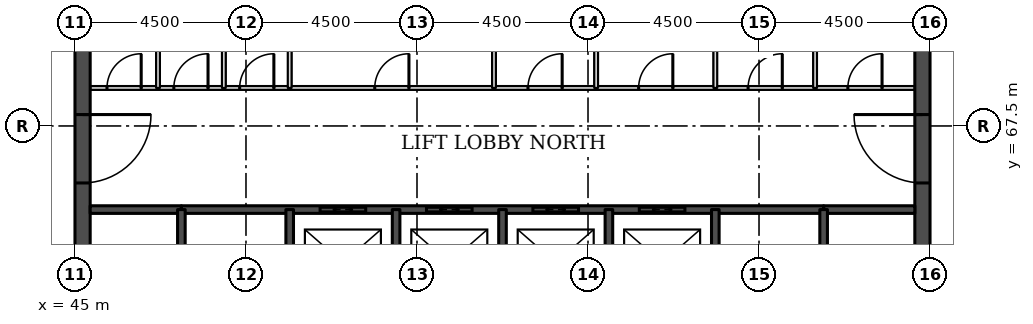
"""IFC4 building model, lengths in metres.
Left out: names, types, materials, properties, quantities, classifications, styles, units other than length and angle.
Written with IfcOpenShell. Run it as: python <this file> out.ifc"""

import sys

from ifc_helpers import new_model, si_unit, direction, frame, frame_2d, origin, place, context, subcontext, project, spatial, rectangle, extrude, element, fill, save


model = new_model("IFC4")
c1 = context("Model", 3, precision=1e-05, world=origin(), true_north=direction((0.0, 1.0)))
c2 = subcontext(c1, "Body", "Model", "MODEL_VIEW")
j1 = project(units=[si_unit("LENGTHUNIT", "METRE"), si_unit("PLANEANGLEUNIT", "RADIAN")], contexts=[c1])
p1 = place(None, origin())
s1 = spatial("IfcSite", under=j1, at=p1, CompositionType="ELEMENT")
p2 = place(p1, origin())
s2 = spatial("IfcBuilding", under=s1, at=p2, CompositionType="ELEMENT")
p3 = place(p2, frame((0.0, 0.0, 252.6)))
s3 = spatial("IfcBuildingStorey", under=s2, at=p3, CompositionType="ELEMENT", Elevation=252.6)
p4 = place(p3, frame((45.2, 49.5, 0.0), z_axis=(0.0, 0.0, 1.0), x_axis=(0.0, 1.0, 0.0)))
e1 = element("IfcWall", 1, at=p4, inside=s3, PredefinedType="SHEAR", context=c2, shape_type="SweptSolid", body=[
    extrude(rectangle(XDim=22.5, YDim=0.4, at=frame_2d((11.25, 0.0))), origin(), (0.0, 0.0, 1.0), 3.7),
])
p5 = place(p4, frame((4.2, 0.0, 0.0)))
e2 = element("IfcOpeningElement", 2, at=p5, cuts=e1, PredefinedType="OPENING", context=c2, shape_type="SweptSolid", body=[
    extrude(rectangle(XDim=1.8, YDim=2.1, at=frame_2d((0.9, 1.05))), frame((0.0, 0.21, 0.0), z_axis=(0.0, -1.0, 0.0), x_axis=(1.0, 0.0, 0.0)), (0.0, 0.0, 1.0), 0.42),
])
p6 = place(p4, frame((6.9, 0.0, 0.0)))
e3 = element("IfcOpeningElement", 3, at=p6, cuts=e1, PredefinedType="OPENING", context=c2, shape_type="SweptSolid", body=[
    extrude(rectangle(XDim=1.1, YDim=2.1, at=frame_2d((0.55, 1.05))), frame((0.0, 0.21, 0.0), z_axis=(0.0, -1.0, 0.0), x_axis=(1.0, 0.0, 0.0)), (0.0, 0.0, 1.0), 0.42),
])
p7 = place(p4, frame((13.6, 0.0, 0.0)))
e4 = element("IfcOpeningElement", 4, at=p7, cuts=e1, PredefinedType="OPENING", context=c2, shape_type="SweptSolid", body=[
    extrude(rectangle(XDim=1.1, YDim=2.1, at=frame_2d((0.55, 1.05))), frame((0.0, 0.21, 0.0), z_axis=(0.0, -1.0, 0.0), x_axis=(1.0, 0.0, 0.0)), (0.0, 0.0, 1.0), 0.42),
])
p8 = place(p4, frame((16.5, 0.0, 0.0)))
e5 = element("IfcOpeningElement", 5, at=p8, cuts=e1, PredefinedType="OPENING", context=c2, shape_type="SweptSolid", body=[
    extrude(rectangle(XDim=1.8, YDim=2.1, at=frame_2d((0.9, 1.05))), frame((0.0, 0.21, 0.0), z_axis=(0.0, -1.0, 0.0), x_axis=(1.0, 0.0, 0.0)), (0.0, 0.0, 1.0), 0.42),
])
p9 = place(p3, frame((67.3, 49.5, 0.0), z_axis=(0.0, 0.0, 1.0), x_axis=(0.0, 1.0, 0.0)))
e6 = element("IfcWall", 6, at=p9, inside=s3, PredefinedType="SHEAR", context=c2, shape_type="SweptSolid", body=[
    extrude(rectangle(XDim=22.5, YDim=0.4, at=frame_2d((11.25, 0.0))), origin(), (0.0, 0.0, 1.0), 3.7),
])
p10 = place(p9, frame((4.2, 0.0, 0.0)))
e7 = element("IfcOpeningElement", 7, at=p10, cuts=e6, PredefinedType="OPENING", context=c2, shape_type="SweptSolid", body=[
    extrude(rectangle(XDim=1.8, YDim=2.1, at=frame_2d((0.9, 1.05))), frame((0.0, 0.21, 0.0), z_axis=(0.0, -1.0, 0.0), x_axis=(1.0, 0.0, 0.0)), (0.0, 0.0, 1.0), 0.42),
])
p11 = place(p9, frame((6.9, 0.0, 0.0)))
e8 = element("IfcOpeningElement", 8, at=p11, cuts=e6, PredefinedType="OPENING", context=c2, shape_type="SweptSolid", body=[
    extrude(rectangle(XDim=1.1, YDim=2.1, at=frame_2d((0.55, 1.05))), frame((0.0, 0.21, 0.0), z_axis=(0.0, -1.0, 0.0), x_axis=(1.0, 0.0, 0.0)), (0.0, 0.0, 1.0), 0.42),
])
p12 = place(p9, frame((13.6, 0.0, 0.0)))
e9 = element("IfcOpeningElement", 9, at=p12, cuts=e6, PredefinedType="OPENING", context=c2, shape_type="SweptSolid", body=[
    extrude(rectangle(XDim=1.1, YDim=2.1, at=frame_2d((0.55, 1.05))), frame((0.0, 0.21, 0.0), z_axis=(0.0, -1.0, 0.0), x_axis=(1.0, 0.0, 0.0)), (0.0, 0.0, 1.0), 0.42),
])
p13 = place(p9, frame((16.5, 0.0, 0.0)))
e10 = element("IfcOpeningElement", 10, at=p13, cuts=e6, PredefinedType="OPENING", context=c2, shape_type="SweptSolid", body=[
    extrude(rectangle(XDim=1.8, YDim=2.1, at=frame_2d((0.9, 1.05))), frame((0.0, 0.21, 0.0), z_axis=(0.0, -1.0, 0.0), x_axis=(1.0, 0.0, 0.0)), (0.0, 0.0, 1.0), 0.42),
])
for number, where, z_axis, x_axis in (
    (11, (45.4, 65.3, 0.0), (0.0, 0.0, 1.0), (1.0, 0.0, 0.0)),
    (12, (64.7, 65.3, 0.0), (0.0, 0.0, 1.0), (1.0, 0.0, 0.0)),
):
    element("IfcWall", number, at=place(p3, frame(where, z_axis=z_axis, x_axis=x_axis)), inside=s3, PredefinedType="SOLIDWALL", context=c2, shape_type="SweptSolid", body=[
        extrude(rectangle(XDim=2.4, YDim=0.2, at=frame_2d((1.2, 0.0))), origin(), (0.0, 0.0, 1.0), 3.55),
    ])
p14 = place(p3, frame((47.8, 65.3, 0.0), z_axis=(0.0, 0.0, 1.0), x_axis=(1.0, 0.0, 0.0)))
e13 = element("IfcWall", 13, at=p14, inside=s3, PredefinedType="SOLIDWALL", context=c2, shape_type="SweptSolid", body=[
    extrude(rectangle(XDim=16.9, YDim=0.2, at=frame_2d((8.45, 0.0))), origin(), (0.0, 0.0, 1.0), 3.55),
])
p15 = place(p14, frame((3.65, 0.0, 0.0)))
e14 = element("IfcOpeningElement", 14, at=p15, cuts=e13, PredefinedType="OPENING", context=c2, shape_type="SweptSolid", body=[
    extrude(rectangle(XDim=1.2, YDim=2.1, at=frame_2d((0.6, 1.05))), frame((0.0, 0.11, 0.0), z_axis=(0.0, -1.0, 0.0), x_axis=(1.0, 0.0, 0.0)), (0.0, 0.0, 1.0), 0.22),
])
p16 = place(p14, frame((6.45, 0.0, 0.0)))
e15 = element("IfcOpeningElement", 15, at=p16, cuts=e13, PredefinedType="OPENING", context=c2, shape_type="SweptSolid", body=[
    extrude(rectangle(XDim=1.2, YDim=2.1, at=frame_2d((0.6, 1.05))), frame((0.0, 0.11, 0.0), z_axis=(0.0, -1.0, 0.0), x_axis=(1.0, 0.0, 0.0)), (0.0, 0.0, 1.0), 0.22),
])
p17 = place(p14, frame((9.25, 0.0, 0.0)))
e16 = element("IfcOpeningElement", 16, at=p17, cuts=e13, PredefinedType="OPENING", context=c2, shape_type="SweptSolid", body=[
    extrude(rectangle(XDim=1.2, YDim=2.1, at=frame_2d((0.6, 1.05))), frame((0.0, 0.11, 0.0), z_axis=(0.0, -1.0, 0.0), x_axis=(1.0, 0.0, 0.0)), (0.0, 0.0, 1.0), 0.22),
])
p18 = place(p14, frame((12.05, 0.0, 0.0)))
e17 = element("IfcOpeningElement", 17, at=p18, cuts=e13, PredefinedType="OPENING", context=c2, shape_type="SweptSolid", body=[
    extrude(rectangle(XDim=1.2, YDim=2.1, at=frame_2d((0.6, 1.05))), frame((0.0, 0.11, 0.0), z_axis=(0.0, -1.0, 0.0), x_axis=(1.0, 0.0, 0.0)), (0.0, 0.0, 1.0), 0.22),
])
p19 = place(p3, frame((45.4, 68.5, 0.0), z_axis=(0.0, 0.0, 1.0), x_axis=(1.0, 0.0, 0.0)))
e18 = element("IfcWall", 18, at=p19, inside=s3, PredefinedType="PARTITIONING", context=c2, shape_type="SweptSolid", body=[
    extrude(rectangle(XDim=21.7, YDim=0.1, at=frame_2d((10.85, 0.0))), origin(), (0.0, 0.0, 1.0), 3.55),
])
p20 = place(p19, frame((19.938, 0.0, 0.0)))
e19 = element("IfcOpeningElement", 19, at=p20, cuts=e18, PredefinedType="OPENING", context=c2, shape_type="SweptSolid", body=[
    extrude(rectangle(XDim=0.9, YDim=2.1, at=frame_2d((0.45, 1.05))), frame((0.0, 0.06, 0.0), z_axis=(0.0, -1.0, 0.0), x_axis=(1.0, 0.0, 0.0)), (0.0, 0.0, 1.0), 0.12),
])
p21 = place(p19, frame((17.312, 0.0, 0.0)))
e20 = element("IfcOpeningElement", 20, at=p21, cuts=e18, PredefinedType="OPENING", context=c2, shape_type="SweptSolid", body=[
    extrude(rectangle(XDim=0.9, YDim=2.1, at=frame_2d((0.45, 1.05))), frame((0.0, 0.06, 0.0), z_axis=(0.0, -1.0, 0.0), x_axis=(1.0, 0.0, 0.0)), (0.0, 0.0, 1.0), 0.12),
])
p22 = place(p19, frame((0.442, 0.0, 0.0)))
e21 = element("IfcOpeningElement", 21, at=p22, cuts=e18, PredefinedType="OPENING", context=c2, shape_type="SweptSolid", body=[
    extrude(rectangle(XDim=0.9, YDim=2.1, at=frame_2d((0.45, 1.05))), frame((0.0, 0.06, 0.0), z_axis=(0.0, -1.0, 0.0), x_axis=(1.0, 0.0, 0.0)), (0.0, 0.0, 1.0), 0.12),
])
p23 = place(p19, frame((2.201, 0.0, 0.0)))
e22 = element("IfcOpeningElement", 22, at=p23, cuts=e18, PredefinedType="OPENING", context=c2, shape_type="SweptSolid", body=[
    extrude(rectangle(XDim=0.9, YDim=2.1, at=frame_2d((0.45, 1.05))), frame((0.0, 0.06, 0.0), z_axis=(0.0, -1.0, 0.0), x_axis=(1.0, 0.0, 0.0)), (0.0, 0.0, 1.0), 0.12),
])
p24 = place(p19, frame((3.934, 0.0, 0.0)))
e23 = element("IfcOpeningElement", 23, at=p24, cuts=e18, PredefinedType="OPENING", context=c2, shape_type="SweptSolid", body=[
    extrude(rectangle(XDim=0.9, YDim=2.1, at=frame_2d((0.45, 1.05))), frame((0.0, 0.06, 0.0), z_axis=(0.0, -1.0, 0.0), x_axis=(1.0, 0.0, 0.0)), (0.0, 0.0, 1.0), 0.12),
])
p25 = place(p19, frame((14.432, 0.0, 0.0)))
e24 = element("IfcOpeningElement", 24, at=p25, cuts=e18, PredefinedType="OPENING", context=c2, shape_type="SweptSolid", body=[
    extrude(rectangle(XDim=0.9, YDim=2.1, at=frame_2d((0.45, 1.05))), frame((0.0, 0.06, 0.0), z_axis=(0.0, -1.0, 0.0), x_axis=(1.0, 0.0, 0.0)), (0.0, 0.0, 1.0), 0.12),
])
p26 = place(p19, frame((11.52, 0.0, 0.0)))
e25 = element("IfcOpeningElement", 25, at=p26, cuts=e18, PredefinedType="OPENING", context=c2, shape_type="SweptSolid", body=[
    extrude(rectangle(XDim=0.9, YDim=2.1, at=frame_2d((0.45, 1.05))), frame((0.0, 0.06, 0.0), z_axis=(0.0, -1.0, 0.0), x_axis=(1.0, 0.0, 0.0)), (0.0, 0.0, 1.0), 0.12),
])
p27 = place(p19, frame((7.488, 0.0, 0.0)))
e26 = element("IfcOpeningElement", 26, at=p27, cuts=e18, PredefinedType="OPENING", context=c2, shape_type="SweptSolid", body=[
    extrude(rectangle(XDim=0.9, YDim=2.1, at=frame_2d((0.45, 1.05))), frame((0.0, 0.06, 0.0), z_axis=(0.0, -1.0, 0.0), x_axis=(1.0, 0.0, 0.0)), (0.0, 0.0, 1.0), 0.12),
])
p28 = place(p3, frame((47.185, 68.5, 0.0), z_axis=(0.0, 0.0, 1.0), x_axis=(0.0, 1.0, 0.0)))
e27 = element("IfcWall", 27, at=p28, inside=s3, PredefinedType="PARTITIONING", context=c2, shape_type="SweptSolid", body=[
    extrude(rectangle(XDim=3.1, YDim=0.1, at=frame_2d((1.55, 0.0))), origin(), (0.0, 0.0, 1.0), 3.55),
])
p29 = place(p3, frame((47.8, 62.0, 0.0), z_axis=(0.0, 0.0, 1.0), x_axis=(0.0, 1.0, 0.0)))
e28 = element("IfcWall", 28, at=p29, inside=s3, PredefinedType="SOLIDWALL", context=c2, shape_type="SweptSolid", body=[
    extrude(rectangle(XDim=3.3, YDim=0.2, at=frame_2d((1.65, 0.0))), origin(), (0.0, 0.0, 1.0), 3.55),
])
p30 = place(p29, frame((1.1, 0.0, 0.0)))
e29 = element("IfcOpeningElement", 29, at=p30, cuts=e28, PredefinedType="OPENING", context=c2, shape_type="SweptSolid", body=[
    extrude(rectangle(XDim=1.1, YDim=2.1, at=frame_2d((0.55, 1.05))), frame((0.0, 0.11, 0.0), z_axis=(0.0, -1.0, 0.0), x_axis=(1.0, 0.0, 0.0)), (0.0, 0.0, 1.0), 0.22),
])
for number, where, z_axis, x_axis in (
    (30, (48.917, 68.5, 0.0), (0.0, 0.0, 1.0), (0.0, 1.0, 0.0)),
    (31, (50.65, 68.5, 0.0), (0.0, 0.0, 1.0), (0.0, 1.0, 0.0)),
):
    element("IfcWall", number, at=place(p3, frame(where, z_axis=z_axis, x_axis=x_axis)), inside=s3, PredefinedType="PARTITIONING", context=c2, shape_type="SweptSolid", body=[
        extrude(rectangle(XDim=3.1, YDim=0.1, at=frame_2d((1.55, 0.0))), origin(), (0.0, 0.0, 1.0), 3.55),
    ])
p31 = place(p3, frame((50.65, 62.0, 0.0), z_axis=(0.0, 0.0, 1.0), x_axis=(0.0, 1.0, 0.0)))
e32 = element("IfcWall", 32, at=p31, inside=s3, PredefinedType="SOLIDWALL", context=c2, shape_type="SweptSolid", body=[
    extrude(rectangle(XDim=3.3, YDim=0.2, at=frame_2d((1.65, 0.0))), origin(), (0.0, 0.0, 1.0), 3.55),
])
p32 = place(p3, frame((53.45, 62.5, 0.0), z_axis=(0.0, 0.0, 1.0), x_axis=(0.0, 1.0, 0.0)))
e33 = element("IfcWall", 33, at=p32, inside=s3, PredefinedType="SOLIDWALL", context=c2, shape_type="SweptSolid", body=[
    extrude(rectangle(XDim=2.8, YDim=0.2, at=frame_2d((1.4, 0.0))), origin(), (0.0, 0.0, 1.0), 3.55),
])
p33 = place(p3, frame((56.026, 68.5, 0.0), z_axis=(0.0, 0.0, 1.0), x_axis=(0.0, 1.0, 0.0)))
e34 = element("IfcWall", 34, at=p33, inside=s3, PredefinedType="PARTITIONING", context=c2, shape_type="SweptSolid", body=[
    extrude(rectangle(XDim=3.1, YDim=0.1, at=frame_2d((1.55, 0.0))), origin(), (0.0, 0.0, 1.0), 3.55),
])
p34 = place(p3, frame((56.25, 62.5, 0.0), z_axis=(0.0, 0.0, 1.0), x_axis=(0.0, 1.0, 0.0)))
e35 = element("IfcWall", 35, at=p34, inside=s3, PredefinedType="SOLIDWALL", context=c2, shape_type="SweptSolid", body=[
    extrude(rectangle(XDim=2.8, YDim=0.2, at=frame_2d((1.4, 0.0))), origin(), (0.0, 0.0, 1.0), 3.55),
])
p35 = place(p3, frame((58.714, 68.5, 0.0), z_axis=(0.0, 0.0, 1.0), x_axis=(0.0, 1.0, 0.0)))
e36 = element("IfcWall", 36, at=p35, inside=s3, PredefinedType="PARTITIONING", context=c2, shape_type="SweptSolid", body=[
    extrude(rectangle(XDim=3.1, YDim=0.1, at=frame_2d((1.55, 0.0))), origin(), (0.0, 0.0, 1.0), 3.55),
])
p36 = place(p3, frame((59.05, 62.5, 0.0), z_axis=(0.0, 0.0, 1.0), x_axis=(0.0, 1.0, 0.0)))
e37 = element("IfcWall", 37, at=p36, inside=s3, PredefinedType="SOLIDWALL", context=c2, shape_type="SweptSolid", body=[
    extrude(rectangle(XDim=2.8, YDim=0.2, at=frame_2d((1.4, 0.0))), origin(), (0.0, 0.0, 1.0), 3.55),
])
p37 = place(p3, frame((61.85, 68.5, 0.0), z_axis=(0.0, 0.0, 1.0), x_axis=(0.0, 1.0, 0.0)))
e38 = element("IfcWall", 38, at=p37, inside=s3, PredefinedType="PARTITIONING", context=c2, shape_type="SweptSolid", body=[
    extrude(rectangle(XDim=3.1, YDim=0.1, at=frame_2d((1.55, 0.0))), origin(), (0.0, 0.0, 1.0), 3.55),
])
p38 = place(p3, frame((61.85, 62.0, 0.0), z_axis=(0.0, 0.0, 1.0), x_axis=(0.0, 1.0, 0.0)))
e39 = element("IfcWall", 39, at=p38, inside=s3, PredefinedType="SOLIDWALL", context=c2, shape_type="SweptSolid", body=[
    extrude(rectangle(XDim=3.3, YDim=0.2, at=frame_2d((1.65, 0.0))), origin(), (0.0, 0.0, 1.0), 3.55),
])
p39 = place(p3, frame((64.475, 68.5, 0.0), z_axis=(0.0, 0.0, 1.0), x_axis=(0.0, 1.0, 0.0)))
e40 = element("IfcWall", 40, at=p39, inside=s3, PredefinedType="PARTITIONING", context=c2, shape_type="SweptSolid", body=[
    extrude(rectangle(XDim=3.1, YDim=0.1, at=frame_2d((1.55, 0.0))), origin(), (0.0, 0.0, 1.0), 3.55),
])
p40 = place(p3, frame((64.7, 62.0, 0.0), z_axis=(0.0, 0.0, 1.0), x_axis=(0.0, 1.0, 0.0)))
e41 = element("IfcWall", 41, at=p40, inside=s3, PredefinedType="SOLIDWALL", context=c2, shape_type="SweptSolid", body=[
    extrude(rectangle(XDim=3.3, YDim=0.2, at=frame_2d((1.65, 0.0))), origin(), (0.0, 0.0, 1.0), 3.55),
])
p41 = place(p40, frame((1.1, 0.0, 0.0)))
e42 = element("IfcOpeningElement", 42, at=p41, cuts=e41, PredefinedType="OPENING", context=c2, shape_type="SweptSolid", body=[
    extrude(rectangle(XDim=1.1, YDim=2.1, at=frame_2d((0.55, 1.05))), frame((0.0, 0.11, 0.0), z_axis=(0.0, -1.0, 0.0), x_axis=(1.0, 0.0, 0.0)), (0.0, 0.0, 1.0), 0.22),
])
p42 = place(p15, origin())
e43 = element("IfcDoor", 43, at=p42, inside=s3, OperationType="DOUBLE_DOOR_SLIDING", PredefinedType="DOOR", context=c2, shape_type="SweptSolid", body=[
    extrude(rectangle(XDim=1.2, YDim=2.1, at=frame_2d((0.6, 1.05))), frame((0.0, 0.025, 0.0), z_axis=(0.0, -1.0, 0.0), x_axis=(1.0, 0.0, 0.0)), (0.0, 0.0, 1.0), 0.05),
])
fill(e14, e43)
p43 = place(p16, origin())
e44 = element("IfcDoor", 44, at=p43, inside=s3, OperationType="DOUBLE_DOOR_SLIDING", PredefinedType="DOOR", context=c2, shape_type="SweptSolid", body=[
    extrude(rectangle(XDim=1.2, YDim=2.1, at=frame_2d((0.6, 1.05))), frame((0.0, 0.025, 0.0), z_axis=(0.0, -1.0, 0.0), x_axis=(1.0, 0.0, 0.0)), (0.0, 0.0, 1.0), 0.05),
])
fill(e15, e44)
p44 = place(p17, origin())
e45 = element("IfcDoor", 45, at=p44, inside=s3, OperationType="DOUBLE_DOOR_SLIDING", PredefinedType="DOOR", context=c2, shape_type="SweptSolid", body=[
    extrude(rectangle(XDim=1.2, YDim=2.1, at=frame_2d((0.6, 1.05))), frame((0.0, 0.025, 0.0), z_axis=(0.0, -1.0, 0.0), x_axis=(1.0, 0.0, 0.0)), (0.0, 0.0, 1.0), 0.05),
])
fill(e16, e45)
p45 = place(p18, origin())
e46 = element("IfcDoor", 46, at=p45, inside=s3, OperationType="DOUBLE_DOOR_SLIDING", PredefinedType="DOOR", context=c2, shape_type="SweptSolid", body=[
    extrude(rectangle(XDim=1.2, YDim=2.1, at=frame_2d((0.6, 1.05))), frame((0.0, 0.025, 0.0), z_axis=(0.0, -1.0, 0.0), x_axis=(1.0, 0.0, 0.0)), (0.0, 0.0, 1.0), 0.05),
])
fill(e17, e46)
p46 = place(p8, frame((1.8, 0.0, 0.0), z_axis=(0.0, 0.0, 1.0), x_axis=(-1.0, 0.0, 0.0)))
e47 = element("IfcDoor", 47, at=p46, inside=s3, OperationType="SINGLE_SWING_LEFT", PredefinedType="DOOR", context=c2, shape_type="SweptSolid", body=[
    extrude(rectangle(XDim=1.8, YDim=2.1, at=frame_2d((0.9, 1.05))), frame((0.0, 0.025, 0.0), z_axis=(0.0, -1.0, 0.0), x_axis=(1.0, 0.0, 0.0)), (0.0, 0.0, 1.0), 0.05),
])
fill(e5, e47)
p47 = place(p13, origin())
e48 = element("IfcDoor", 48, at=p47, inside=s3, OperationType="SINGLE_SWING_RIGHT", PredefinedType="DOOR", context=c2, shape_type="SweptSolid", body=[
    extrude(rectangle(XDim=1.8, YDim=2.1, at=frame_2d((0.9, 1.05))), frame((0.0, 0.025, 0.0), z_axis=(0.0, -1.0, 0.0), x_axis=(1.0, 0.0, 0.0)), (0.0, 0.0, 1.0), 0.05),
])
fill(e10, e48)
p48 = place(p20, origin())
e49 = element("IfcDoor", 49, at=p48, inside=s3, OperationType="SINGLE_SWING_RIGHT", PredefinedType="DOOR", context=c2, shape_type="SweptSolid", body=[
    extrude(rectangle(XDim=0.9, YDim=2.1, at=frame_2d((0.45, 1.05))), frame((0.0, 0.025, 0.0), z_axis=(0.0, -1.0, 0.0), x_axis=(1.0, 0.0, 0.0)), (0.0, 0.0, 1.0), 0.05),
])
fill(e19, e49)
p49 = place(p21, origin())
e50 = element("IfcDoor", 50, at=p49, inside=s3, OperationType="SINGLE_SWING_RIGHT", PredefinedType="DOOR", context=c2, shape_type="SweptSolid", body=[
    extrude(rectangle(XDim=0.9, YDim=2.1, at=frame_2d((0.45, 1.05))), frame((0.0, 0.025, 0.0), z_axis=(0.0, -1.0, 0.0), x_axis=(1.0, 0.0, 0.0)), (0.0, 0.0, 1.0), 0.05),
])
fill(e20, e50)
p50 = place(p22, origin())
e51 = element("IfcDoor", 51, at=p50, inside=s3, OperationType="SINGLE_SWING_RIGHT", PredefinedType="DOOR", context=c2, shape_type="SweptSolid", body=[
    extrude(rectangle(XDim=0.9, YDim=2.1, at=frame_2d((0.45, 1.05))), frame((0.0, 0.025, 0.0), z_axis=(0.0, -1.0, 0.0), x_axis=(1.0, 0.0, 0.0)), (0.0, 0.0, 1.0), 0.05),
])
fill(e21, e51)
p51 = place(p23, origin())
e52 = element("IfcDoor", 52, at=p51, inside=s3, OperationType="SINGLE_SWING_RIGHT", PredefinedType="DOOR", context=c2, shape_type="SweptSolid", body=[
    extrude(rectangle(XDim=0.9, YDim=2.1, at=frame_2d((0.45, 1.05))), frame((0.0, 0.025, 0.0), z_axis=(0.0, -1.0, 0.0), x_axis=(1.0, 0.0, 0.0)), (0.0, 0.0, 1.0), 0.05),
])
fill(e22, e52)
p52 = place(p24, origin())
e53 = element("IfcDoor", 53, at=p52, inside=s3, OperationType="SINGLE_SWING_RIGHT", PredefinedType="DOOR", context=c2, shape_type="SweptSolid", body=[
    extrude(rectangle(XDim=0.9, YDim=2.1, at=frame_2d((0.45, 1.05))), frame((0.0, 0.025, 0.0), z_axis=(0.0, -1.0, 0.0), x_axis=(1.0, 0.0, 0.0)), (0.0, 0.0, 1.0), 0.05),
])
fill(e23, e53)
p53 = place(p25, origin())
e54 = element("IfcDoor", 54, at=p53, inside=s3, OperationType="SINGLE_SWING_RIGHT", PredefinedType="DOOR", context=c2, shape_type="SweptSolid", body=[
    extrude(rectangle(XDim=0.9, YDim=2.1, at=frame_2d((0.45, 1.05))), frame((0.0, 0.025, 0.0), z_axis=(0.0, -1.0, 0.0), x_axis=(1.0, 0.0, 0.0)), (0.0, 0.0, 1.0), 0.05),
])
fill(e24, e54)
p54 = place(p26, origin())
e55 = element("IfcDoor", 55, at=p54, inside=s3, OperationType="SINGLE_SWING_RIGHT", PredefinedType="DOOR", context=c2, shape_type="SweptSolid", body=[
    extrude(rectangle(XDim=0.9, YDim=2.1, at=frame_2d((0.45, 1.05))), frame((0.0, 0.025, 0.0), z_axis=(0.0, -1.0, 0.0), x_axis=(1.0, 0.0, 0.0)), (0.0, 0.0, 1.0), 0.05),
])
fill(e25, e55)
p55 = place(p27, origin())
e56 = element("IfcDoor", 56, at=p55, inside=s3, OperationType="SINGLE_SWING_RIGHT", PredefinedType="DOOR", context=c2, shape_type="SweptSolid", body=[
    extrude(rectangle(XDim=0.9, YDim=2.1, at=frame_2d((0.45, 1.05))), frame((0.0, 0.025, 0.0), z_axis=(0.0, -1.0, 0.0), x_axis=(1.0, 0.0, 0.0)), (0.0, 0.0, 1.0), 0.05),
])
fill(e26, e56)
save(model, sys.argv[1])
